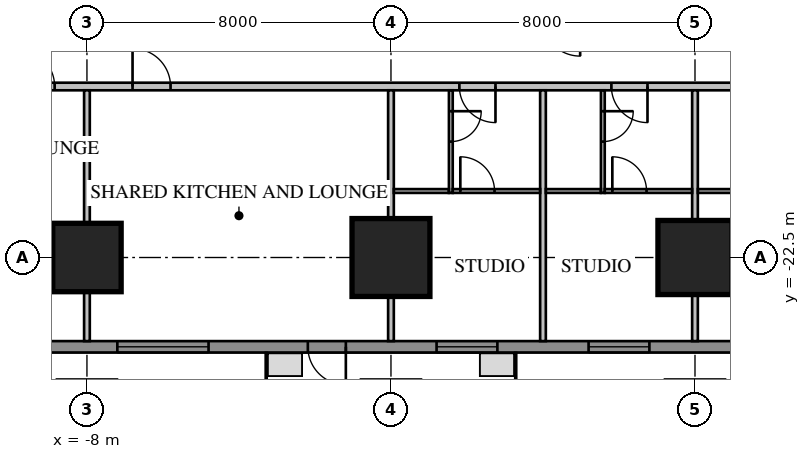
"""IFC4 building model, lengths in metres.
Left out: names, types, materials, properties, quantities, classifications, styles, units other than length and angle.
Written with IfcOpenShell. Run it as: python <this file> out.ifc"""

import sys

from ifc_helpers import new_model, si_unit, direction, frame, frame_2d, origin, origin_2d, place, context, subcontext, project, spatial, rectangle, extrude, element, fill, save


model = new_model("IFC4")
c1 = context("Model", 3, precision=1e-05, world=origin(), true_north=direction((0.0, 1.0)))
c2 = subcontext(c1, "Body", "Model", "MODEL_VIEW")
j1 = project(units=[si_unit("LENGTHUNIT", "METRE"), si_unit("PLANEANGLEUNIT", "RADIAN")], contexts=[c1])
p1 = place(None, origin())
s1 = spatial("IfcSite", under=j1, at=p1, CompositionType="ELEMENT")
p2 = place(p1, origin())
s2 = spatial("IfcBuilding", under=s1, at=p2, CompositionType="ELEMENT")
p3 = place(p2, frame((0.0, 0.0, 23.7)))
s3 = spatial("IfcBuildingStorey", under=s2, at=p3, CompositionType="ELEMENT", Elevation=23.7)
p4 = place(p3, frame((-8.0, -22.5, 0.0), z_axis=(0.0, 0.0, 1.0), x_axis=(1.0, 0.0, 0.0)))
e1 = element("IfcColumn", 1, at=p4, inside=s3, PredefinedType="COLUMN", context=c2, shape_type="SweptSolid", body=[
    extrude(rectangle(XDim=1.8, YDim=1.8, at=origin_2d()), origin(), (0.0, 0.0, 1.0), 3.85),
])
p5 = place(p3, frame((0.0, -22.5, 0.0), z_axis=(0.0, 0.0, 1.0), x_axis=(1.0, 0.0, 0.0)))
e2 = element("IfcColumn", 2, at=p5, inside=s3, PredefinedType="COLUMN", context=c2, shape_type="SweptSolid", body=[
    extrude(rectangle(XDim=2.05, YDim=2.05, at=origin_2d()), origin(), (0.0, 0.0, 1.0), 3.85),
])
p6 = place(p3, frame((8.0, -22.5, 0.0), z_axis=(0.0, 0.0, 1.0), x_axis=(1.0, 0.0, 0.0)))
e3 = element("IfcColumn", 3, at=p6, inside=s3, PredefinedType="COLUMN", context=c2, shape_type="SweptSolid", body=[
    extrude(rectangle(XDim=1.95, YDim=1.95, at=origin_2d()), origin(), (0.0, 0.0, 1.0), 3.85),
])
p7 = place(p3, frame((-16.0, -24.85, 0.0), z_axis=(0.0, 0.0, 1.0), x_axis=(1.0, 0.0, 0.0)))
e4 = element("IfcWall", 4, at=p7, inside=s3, PredefinedType="SOLIDWALL", context=c2, shape_type="SweptSolid", body=[
    extrude(rectangle(XDim=32.0, YDim=0.3, at=frame_2d((16.0, 0.0))), origin(), (0.0, 0.0, 1.0), 3.65),
])
p8 = place(p7, frame((1.2, 0.0, 0.75)))
e5 = element("IfcOpeningElement", 5, at=p8, cuts=e4, PredefinedType="OPENING", context=c2, shape_type="SweptSolid", body=[
    extrude(rectangle(XDim=1.6, YDim=1.8, at=frame_2d((0.8, 0.9))), frame((0.0, 0.17, 0.0), z_axis=(0.0, -1.0, 0.0), x_axis=(1.0, 0.0, 0.0)), (0.0, 0.0, 1.0), 0.34),
])
p9 = place(p7, frame((5.2, 0.0, 0.75)))
e6 = element("IfcOpeningElement", 6, at=p9, cuts=e4, PredefinedType="OPENING", context=c2, shape_type="SweptSolid", body=[
    extrude(rectangle(XDim=1.6, YDim=1.8, at=frame_2d((0.8, 0.9))), frame((0.0, 0.17, 0.0), z_axis=(0.0, -1.0, 0.0), x_axis=(1.0, 0.0, 0.0)), (0.0, 0.0, 1.0), 0.34),
])
p10 = place(p7, frame((17.2, 0.0, 0.75)))
e7 = element("IfcOpeningElement", 7, at=p10, cuts=e4, PredefinedType="OPENING", context=c2, shape_type="SweptSolid", body=[
    extrude(rectangle(XDim=1.6, YDim=1.8, at=frame_2d((0.8, 0.9))), frame((0.0, 0.17, 0.0), z_axis=(0.0, -1.0, 0.0), x_axis=(1.0, 0.0, 0.0)), (0.0, 0.0, 1.0), 0.34),
])
p11 = place(p7, frame((21.2, 0.0, 0.75)))
e8 = element("IfcOpeningElement", 8, at=p11, cuts=e4, PredefinedType="OPENING", context=c2, shape_type="SweptSolid", body=[
    extrude(rectangle(XDim=1.6, YDim=1.8, at=frame_2d((0.8, 0.9))), frame((0.0, 0.17, 0.0), z_axis=(0.0, -1.0, 0.0), x_axis=(1.0, 0.0, 0.0)), (0.0, 0.0, 1.0), 0.34),
])
p12 = place(p7, frame((25.2, 0.0, 0.75)))
e9 = element("IfcOpeningElement", 9, at=p12, cuts=e4, PredefinedType="OPENING", context=c2, shape_type="SweptSolid", body=[
    extrude(rectangle(XDim=1.6, YDim=1.8, at=frame_2d((0.8, 0.9))), frame((0.0, 0.17, 0.0), z_axis=(0.0, -1.0, 0.0), x_axis=(1.0, 0.0, 0.0)), (0.0, 0.0, 1.0), 0.34),
])
p13 = place(p7, frame((29.2, 0.0, 0.75)))
e10 = element("IfcOpeningElement", 10, at=p13, cuts=e4, PredefinedType="OPENING", context=c2, shape_type="SweptSolid", body=[
    extrude(rectangle(XDim=1.6, YDim=1.8, at=frame_2d((0.8, 0.9))), frame((0.0, 0.17, 0.0), z_axis=(0.0, -1.0, 0.0), x_axis=(1.0, 0.0, 0.0)), (0.0, 0.0, 1.0), 0.34),
])
p14 = place(p7, frame((8.8, 0.0, 0.75)))
e11 = element("IfcOpeningElement", 11, at=p14, cuts=e4, PredefinedType="OPENING", context=c2, shape_type="SweptSolid", body=[
    extrude(rectangle(XDim=2.4, YDim=1.8, at=frame_2d((1.2, 0.9))), frame((0.0, 0.17, 0.0), z_axis=(0.0, -1.0, 0.0), x_axis=(1.0, 0.0, 0.0)), (0.0, 0.0, 1.0), 0.34),
])
p15 = place(p7, frame((13.812, 0.0, 0.0)))
e12 = element("IfcOpeningElement", 12, at=p15, cuts=e4, PredefinedType="OPENING", context=c2, shape_type="SweptSolid", body=[
    extrude(rectangle(XDim=1.0, YDim=2.4, at=frame_2d((0.5, 1.2))), frame((0.0, 0.17, 0.0), z_axis=(0.0, -1.0, 0.0), x_axis=(1.0, 0.0, 0.0)), (0.0, 0.0, 1.0), 0.34),
])
p16 = place(p3, frame((-18.0, -18.0, 0.0), z_axis=(0.0, 0.0, 1.0), x_axis=(1.0, 0.0, 0.0)))
e13 = element("IfcWall", 13, at=p16, inside=s3, PredefinedType="PARTITIONING", context=c2, shape_type="SweptSolid", body=[
    extrude(rectangle(XDim=36.0, YDim=0.2, at=frame_2d((18.0, 0.0))), origin(), (0.0, 0.0, 1.0), 3.65),
])
p17 = place(p16, frame((0.375, 0.0, 0.0)))
e14 = element("IfcOpeningElement", 14, at=p17, cuts=e13, PredefinedType="OPENING", context=c2, shape_type="SweptSolid", body=[
    extrude(rectangle(XDim=1.0, YDim=2.1, at=frame_2d((0.5, 1.05))), frame((0.0, 0.12, 0.0), z_axis=(0.0, -1.0, 0.0), x_axis=(1.0, 0.0, 0.0)), (0.0, 0.0, 1.0), 0.24),
])
p18 = place(p16, frame((2.45, 0.0, 0.0)))
e15 = element("IfcOpeningElement", 15, at=p18, cuts=e13, PredefinedType="OPENING", context=c2, shape_type="SweptSolid", body=[
    extrude(rectangle(XDim=0.8, YDim=2.1, at=frame_2d((0.4, 1.05))), frame((0.0, 0.12, 0.0), z_axis=(0.0, -1.0, 0.0), x_axis=(1.0, 0.0, 0.0)), (0.0, 0.0, 1.0), 0.24),
])
p19 = place(p16, frame((4.05, 0.0, 0.0)))
e16 = element("IfcOpeningElement", 16, at=p19, cuts=e13, PredefinedType="OPENING", context=c2, shape_type="SweptSolid", body=[
    extrude(rectangle(XDim=1.0, YDim=2.1, at=frame_2d((0.5, 1.05))), frame((0.0, 0.12, 0.0), z_axis=(0.0, -1.0, 0.0), x_axis=(1.0, 0.0, 0.0)), (0.0, 0.0, 1.0), 0.24),
])
p20 = place(p16, frame((6.45, 0.0, 0.0)))
e17 = element("IfcOpeningElement", 17, at=p20, cuts=e13, PredefinedType="OPENING", context=c2, shape_type="SweptSolid", body=[
    extrude(rectangle(XDim=0.9, YDim=2.1, at=frame_2d((0.45, 1.05))), frame((0.0, 0.12, 0.0), z_axis=(0.0, -1.0, 0.0), x_axis=(1.0, 0.0, 0.0)), (0.0, 0.0, 1.0), 0.24),
])
p21 = place(p16, frame((8.15, 0.0, 0.0)))
e18 = element("IfcOpeningElement", 18, at=p21, cuts=e13, PredefinedType="OPENING", context=c2, shape_type="SweptSolid", body=[
    extrude(rectangle(XDim=1.0, YDim=2.1, at=frame_2d((0.5, 1.05))), frame((0.0, 0.12, 0.0), z_axis=(0.0, -1.0, 0.0), x_axis=(1.0, 0.0, 0.0)), (0.0, 0.0, 1.0), 0.24),
])
p22 = place(p16, frame((19.8, 0.0, 0.0)))
e19 = element("IfcOpeningElement", 19, at=p22, cuts=e13, PredefinedType="OPENING", context=c2, shape_type="SweptSolid", body=[
    extrude(rectangle(XDim=0.95, YDim=2.1, at=frame_2d((0.475, 1.05))), frame((0.0, 0.12, 0.0), z_axis=(0.0, -1.0, 0.0), x_axis=(1.0, 0.0, 0.0)), (0.0, 0.0, 1.0), 0.24),
])
p23 = place(p16, frame((23.8, 0.0, 0.0)))
e20 = element("IfcOpeningElement", 20, at=p23, cuts=e13, PredefinedType="OPENING", context=c2, shape_type="SweptSolid", body=[
    extrude(rectangle(XDim=0.95, YDim=2.1, at=frame_2d((0.475, 1.05))), frame((0.0, 0.12, 0.0), z_axis=(0.0, -1.0, 0.0), x_axis=(1.0, 0.0, 0.0)), (0.0, 0.0, 1.0), 0.24),
])
p24 = place(p16, frame((27.8, 0.0, 0.0)))
e21 = element("IfcOpeningElement", 21, at=p24, cuts=e13, PredefinedType="OPENING", context=c2, shape_type="SweptSolid", body=[
    extrude(rectangle(XDim=0.95, YDim=2.1, at=frame_2d((0.475, 1.05))), frame((0.0, 0.12, 0.0), z_axis=(0.0, -1.0, 0.0), x_axis=(1.0, 0.0, 0.0)), (0.0, 0.0, 1.0), 0.24),
])
p25 = place(p16, frame((31.8, 0.0, 0.0)))
e22 = element("IfcOpeningElement", 22, at=p25, cuts=e13, PredefinedType="OPENING", context=c2, shape_type="SweptSolid", body=[
    extrude(rectangle(XDim=0.95, YDim=2.1, at=frame_2d((0.475, 1.05))), frame((0.0, 0.12, 0.0), z_axis=(0.0, -1.0, 0.0), x_axis=(1.0, 0.0, 0.0)), (0.0, 0.0, 1.0), 0.24),
])
p26 = place(p16, frame((34.375, 0.0, 0.0)))
e23 = element("IfcOpeningElement", 23, at=p26, cuts=e13, PredefinedType="OPENING", context=c2, shape_type="SweptSolid", body=[
    extrude(rectangle(XDim=0.95, YDim=2.1, at=frame_2d((0.475, 1.05))), frame((0.0, 0.12, 0.0), z_axis=(0.0, -1.0, 0.0), x_axis=(1.0, 0.0, 0.0)), (0.0, 0.0, 1.0), 0.24),
])
p27 = place(p16, frame((11.2, 0.0, 0.0)))
e24 = element("IfcOpeningElement", 24, at=p27, cuts=e13, PredefinedType="OPENING", context=c2, shape_type="SweptSolid", body=[
    extrude(rectangle(XDim=1.0, YDim=2.1, at=frame_2d((0.5, 1.05))), frame((0.0, 0.12, 0.0), z_axis=(0.0, -1.0, 0.0), x_axis=(1.0, 0.0, 0.0)), (0.0, 0.0, 1.0), 0.24),
])
p28 = place(p3, frame((-8.0, -18.1, 0.0), z_axis=(0.0, 0.0, 1.0), x_axis=(0.0, -1.0, 0.0)))
e25 = element("IfcWall", 25, at=p28, inside=s3, PredefinedType="PARTITIONING", context=c2, shape_type="SweptSolid", body=[
    extrude(rectangle(XDim=6.6, YDim=0.15, at=frame_2d((3.3, 0.0))), origin(), (0.0, 0.0, 1.0), 3.65),
])
p29 = place(p3, frame((0.0, -18.1, 0.0), z_axis=(0.0, 0.0, 1.0), x_axis=(0.0, -1.0, 0.0)))
e26 = element("IfcWall", 26, at=p29, inside=s3, PredefinedType="PARTITIONING", context=c2, shape_type="SweptSolid", body=[
    extrude(rectangle(XDim=6.6, YDim=0.15, at=frame_2d((3.3, 0.0))), origin(), (0.0, 0.0, 1.0), 2.809),
])
for number, where, z_axis, x_axis in (
    (27, (4.0, -18.1, 0.0), (0.0, 0.0, 1.0), (0.0, -1.0, 0.0)),
    (28, (8.0, -18.1, 0.0), (0.0, 0.0, 1.0), (0.0, -1.0, 0.0)),
):
    element("IfcWall", number, at=place(p3, frame(where, z_axis=z_axis, x_axis=x_axis)), inside=s3, PredefinedType="PARTITIONING", context=c2, shape_type="SweptSolid", body=[
        extrude(rectangle(XDim=6.6, YDim=0.15, at=frame_2d((3.3, 0.0))), origin(), (0.0, 0.0, 1.0), 3.65),
    ])
p30 = place(p3, frame((1.575, -18.1, 0.0), z_axis=(0.0, 0.0, 1.0), x_axis=(0.0, -1.0, 0.0)))
e29 = element("IfcWall", 29, at=p30, inside=s3, PredefinedType="PARTITIONING", context=c2, shape_type="SweptSolid", body=[
    extrude(rectangle(XDim=2.7, YDim=0.1, at=frame_2d((1.35, 0.0))), origin(), (0.0, 0.0, 1.0), 3.65),
])
p31 = place(p30, frame((0.55, 0.0, 0.0)))
e30 = element("IfcOpeningElement", 30, at=p31, cuts=e29, PredefinedType="OPENING", context=c2, shape_type="SweptSolid", body=[
    extrude(rectangle(XDim=0.8, YDim=2.1, at=frame_2d((0.4, 1.05))), frame((0.0, 0.07, 0.0), z_axis=(0.0, -1.0, 0.0), x_axis=(1.0, 0.0, 0.0)), (0.0, 0.0, 1.0), 0.14),
])
p32 = place(p3, frame((0.075, -20.75, 0.0), z_axis=(0.0, 0.0, 1.0), x_axis=(1.0, 0.0, 0.0)))
e31 = element("IfcWall", 31, at=p32, inside=s3, PredefinedType="PARTITIONING", context=c2, shape_type="SweptSolid", body=[
    extrude(rectangle(XDim=1.45, YDim=0.1, at=frame_2d((0.725, 0.0))), origin(), (0.0, 0.0, 1.0), 3.65),
])
p33 = place(p3, frame((5.575, -18.1, 0.0), z_axis=(0.0, 0.0, 1.0), x_axis=(0.0, -1.0, 0.0)))
e32 = element("IfcWall", 32, at=p33, inside=s3, PredefinedType="PARTITIONING", context=c2, shape_type="SweptSolid", body=[
    extrude(rectangle(XDim=2.7, YDim=0.1, at=frame_2d((1.35, 0.0))), origin(), (0.0, 0.0, 1.0), 3.65),
])
p34 = place(p33, frame((0.55, 0.0, 0.0)))
e33 = element("IfcOpeningElement", 33, at=p34, cuts=e32, PredefinedType="OPENING", context=c2, shape_type="SweptSolid", body=[
    extrude(rectangle(XDim=0.8, YDim=2.1, at=frame_2d((0.4, 1.05))), frame((0.0, 0.07, 0.0), z_axis=(0.0, -1.0, 0.0), x_axis=(1.0, 0.0, 0.0)), (0.0, 0.0, 1.0), 0.14),
])
for number, where, z_axis, x_axis in (
    (34, (4.075, -20.75, 0.0), (0.0, 0.0, 1.0), (1.0, 0.0, 0.0)),
    (35, (8.075, -20.75, 0.0), (0.0, 0.0, 1.0), (1.0, 0.0, 0.0)),
):
    element("IfcWall", number, at=place(p3, frame(where, z_axis=z_axis, x_axis=x_axis)), inside=s3, PredefinedType="PARTITIONING", context=c2, shape_type="SweptSolid", body=[
        extrude(rectangle(XDim=1.45, YDim=0.1, at=frame_2d((0.725, 0.0))), origin(), (0.0, 0.0, 1.0), 3.65),
    ])
p35 = place(p3, frame((1.625, -20.75, 0.0), z_axis=(0.0, 0.0, 1.0), x_axis=(1.0, 0.0, 0.0)))
e36 = element("IfcWall", 36, at=p35, inside=s3, PredefinedType="PARTITIONING", context=c2, shape_type="SweptSolid", body=[
    extrude(rectangle(XDim=2.3, YDim=0.1, at=frame_2d((1.15, 0.0))), origin(), (0.0, 0.0, 1.0), 3.65),
])
p36 = place(p35, frame((0.2, 0.0, 0.0)))
e37 = element("IfcOpeningElement", 37, at=p36, cuts=e36, PredefinedType="OPENING", context=c2, shape_type="SweptSolid", body=[
    extrude(rectangle(XDim=0.9, YDim=2.1, at=frame_2d((0.45, 1.05))), frame((0.0, 0.07, 0.0), z_axis=(0.0, -1.0, 0.0), x_axis=(1.0, 0.0, 0.0)), (0.0, 0.0, 1.0), 0.14),
])
p37 = place(p3, frame((5.625, -20.75, 0.0), z_axis=(0.0, 0.0, 1.0), x_axis=(1.0, 0.0, 0.0)))
e38 = element("IfcWall", 38, at=p37, inside=s3, PredefinedType="PARTITIONING", context=c2, shape_type="SweptSolid", body=[
    extrude(rectangle(XDim=2.3, YDim=0.1, at=frame_2d((1.15, 0.0))), origin(), (0.0, 0.0, 1.0), 3.65),
])
p38 = place(p37, frame((0.2, 0.0, 0.0)))
e39 = element("IfcOpeningElement", 39, at=p38, cuts=e38, PredefinedType="OPENING", context=c2, shape_type="SweptSolid", body=[
    extrude(rectangle(XDim=0.9, YDim=2.1, at=frame_2d((0.45, 1.05))), frame((0.0, 0.07, 0.0), z_axis=(0.0, -1.0, 0.0), x_axis=(1.0, 0.0, 0.0)), (0.0, 0.0, 1.0), 0.14),
])
p39 = place(p10, origin())
e40 = element("IfcWindow", 40, at=p39, inside=s3, PartitioningType="SINGLE_PANEL", PredefinedType="WINDOW", context=c2, shape_type="SweptSolid", body=[
    extrude(rectangle(XDim=1.6, YDim=1.8, at=frame_2d((0.8, 0.9))), frame((0.0, 0.03, 0.0), z_axis=(0.0, -1.0, 0.0), x_axis=(1.0, 0.0, 0.0)), (0.0, 0.0, 1.0), 0.06),
])
fill(e7, e40)
p40 = place(p11, origin())
e41 = element("IfcWindow", 41, at=p40, inside=s3, PartitioningType="SINGLE_PANEL", PredefinedType="WINDOW", context=c2, shape_type="SweptSolid", body=[
    extrude(rectangle(XDim=1.6, YDim=1.8, at=frame_2d((0.8, 0.9))), frame((0.0, 0.03, 0.0), z_axis=(0.0, -1.0, 0.0), x_axis=(1.0, 0.0, 0.0)), (0.0, 0.0, 1.0), 0.06),
])
fill(e8, e41)
p41 = place(p14, origin())
e42 = element("IfcWindow", 42, at=p41, inside=s3, PartitioningType="SINGLE_PANEL", PredefinedType="WINDOW", context=c2, shape_type="SweptSolid", body=[
    extrude(rectangle(XDim=2.4, YDim=1.8, at=frame_2d((1.2, 0.9))), frame((0.0, 0.03, 0.0), z_axis=(0.0, -1.0, 0.0), x_axis=(1.0, 0.0, 0.0)), (0.0, 0.0, 1.0), 0.06),
])
fill(e11, e42)
p42 = place(p15, origin())
e43 = element("IfcDoor", 43, at=p42, inside=s3, OperationType="SINGLE_SWING_RIGHT", PredefinedType="DOOR", context=c2, shape_type="SweptSolid", body=[
    extrude(rectangle(XDim=1.0, YDim=2.4, at=frame_2d((0.5, 1.2))), frame((0.0, 0.025, 0.0), z_axis=(0.0, -1.0, 0.0), x_axis=(1.0, 0.0, 0.0)), (0.0, 0.0, 1.0), 0.05),
])
fill(e12, e43)
p43 = place(p21, origin())
e44 = element("IfcDoor", 44, at=p43, inside=s3, OperationType="SINGLE_SWING_LEFT", PredefinedType="DOOR", context=c2, shape_type="SweptSolid", body=[
    extrude(rectangle(XDim=1.0, YDim=2.1, at=frame_2d((0.5, 1.05))), frame((0.0, 0.025, 0.0), z_axis=(0.0, -1.0, 0.0), x_axis=(1.0, 0.0, 0.0)), (0.0, 0.0, 1.0), 0.05),
])
fill(e18, e44)
p44 = place(p22, origin())
e45 = element("IfcDoor", 45, at=p44, inside=s3, OperationType="SINGLE_SWING_RIGHT", PredefinedType="DOOR", context=c2, shape_type="SweptSolid", body=[
    extrude(rectangle(XDim=0.95, YDim=2.1, at=frame_2d((0.475, 1.05))), frame((0.0, 0.025, 0.0), z_axis=(0.0, -1.0, 0.0), x_axis=(1.0, 0.0, 0.0)), (0.0, 0.0, 1.0), 0.05),
])
fill(e19, e45)
p45 = place(p31, origin())
e46 = element("IfcDoor", 46, at=p45, inside=s3, OperationType="SINGLE_SWING_LEFT", PredefinedType="DOOR", context=c2, shape_type="SweptSolid", body=[
    extrude(rectangle(XDim=0.8, YDim=2.1, at=frame_2d((0.4, 1.05))), frame((0.0, 0.025, 0.0), z_axis=(0.0, -1.0, 0.0), x_axis=(1.0, 0.0, 0.0)), (0.0, 0.0, 1.0), 0.05),
])
fill(e30, e46)
p46 = place(p23, origin())
e47 = element("IfcDoor", 47, at=p46, inside=s3, OperationType="SINGLE_SWING_RIGHT", PredefinedType="DOOR", context=c2, shape_type="SweptSolid", body=[
    extrude(rectangle(XDim=0.95, YDim=2.1, at=frame_2d((0.475, 1.05))), frame((0.0, 0.025, 0.0), z_axis=(0.0, -1.0, 0.0), x_axis=(1.0, 0.0, 0.0)), (0.0, 0.0, 1.0), 0.05),
])
fill(e20, e47)
p47 = place(p34, origin())
e48 = element("IfcDoor", 48, at=p47, inside=s3, OperationType="SINGLE_SWING_LEFT", PredefinedType="DOOR", context=c2, shape_type="SweptSolid", body=[
    extrude(rectangle(XDim=0.8, YDim=2.1, at=frame_2d((0.4, 1.05))), frame((0.0, 0.025, 0.0), z_axis=(0.0, -1.0, 0.0), x_axis=(1.0, 0.0, 0.0)), (0.0, 0.0, 1.0), 0.05),
])
fill(e33, e48)
p48 = place(p27, origin())
e49 = element("IfcDoor", 49, at=p48, inside=s3, OperationType="SINGLE_SWING_LEFT", PredefinedType="DOOR", context=c2, shape_type="SweptSolid", body=[
    extrude(rectangle(XDim=1.0, YDim=2.1, at=frame_2d((0.5, 1.05))), frame((0.0, 0.025, 0.0), z_axis=(0.0, -1.0, 0.0), x_axis=(1.0, 0.0, 0.0)), (0.0, 0.0, 1.0), 0.05),
])
fill(e24, e49)
p49 = place(p36, origin())
e50 = element("IfcDoor", 50, at=p49, inside=s3, OperationType="SINGLE_SWING_LEFT", PredefinedType="DOOR", context=c2, shape_type="SweptSolid", body=[
    extrude(rectangle(XDim=0.9, YDim=2.1, at=frame_2d((0.45, 1.05))), frame((0.0, 0.025, 0.0), z_axis=(0.0, -1.0, 0.0), x_axis=(1.0, 0.0, 0.0)), (0.0, 0.0, 1.0), 0.05),
])
fill(e37, e50)
p50 = place(p38, origin())
e51 = element("IfcDoor", 51, at=p50, inside=s3, OperationType="SINGLE_SWING_LEFT", PredefinedType="DOOR", context=c2, shape_type="SweptSolid", body=[
    extrude(rectangle(XDim=0.9, YDim=2.1, at=frame_2d((0.45, 1.05))), frame((0.0, 0.025, 0.0), z_axis=(0.0, -1.0, 0.0), x_axis=(1.0, 0.0, 0.0)), (0.0, 0.0, 1.0), 0.05),
])
fill(e39, e51)
save(model, sys.argv[1])
